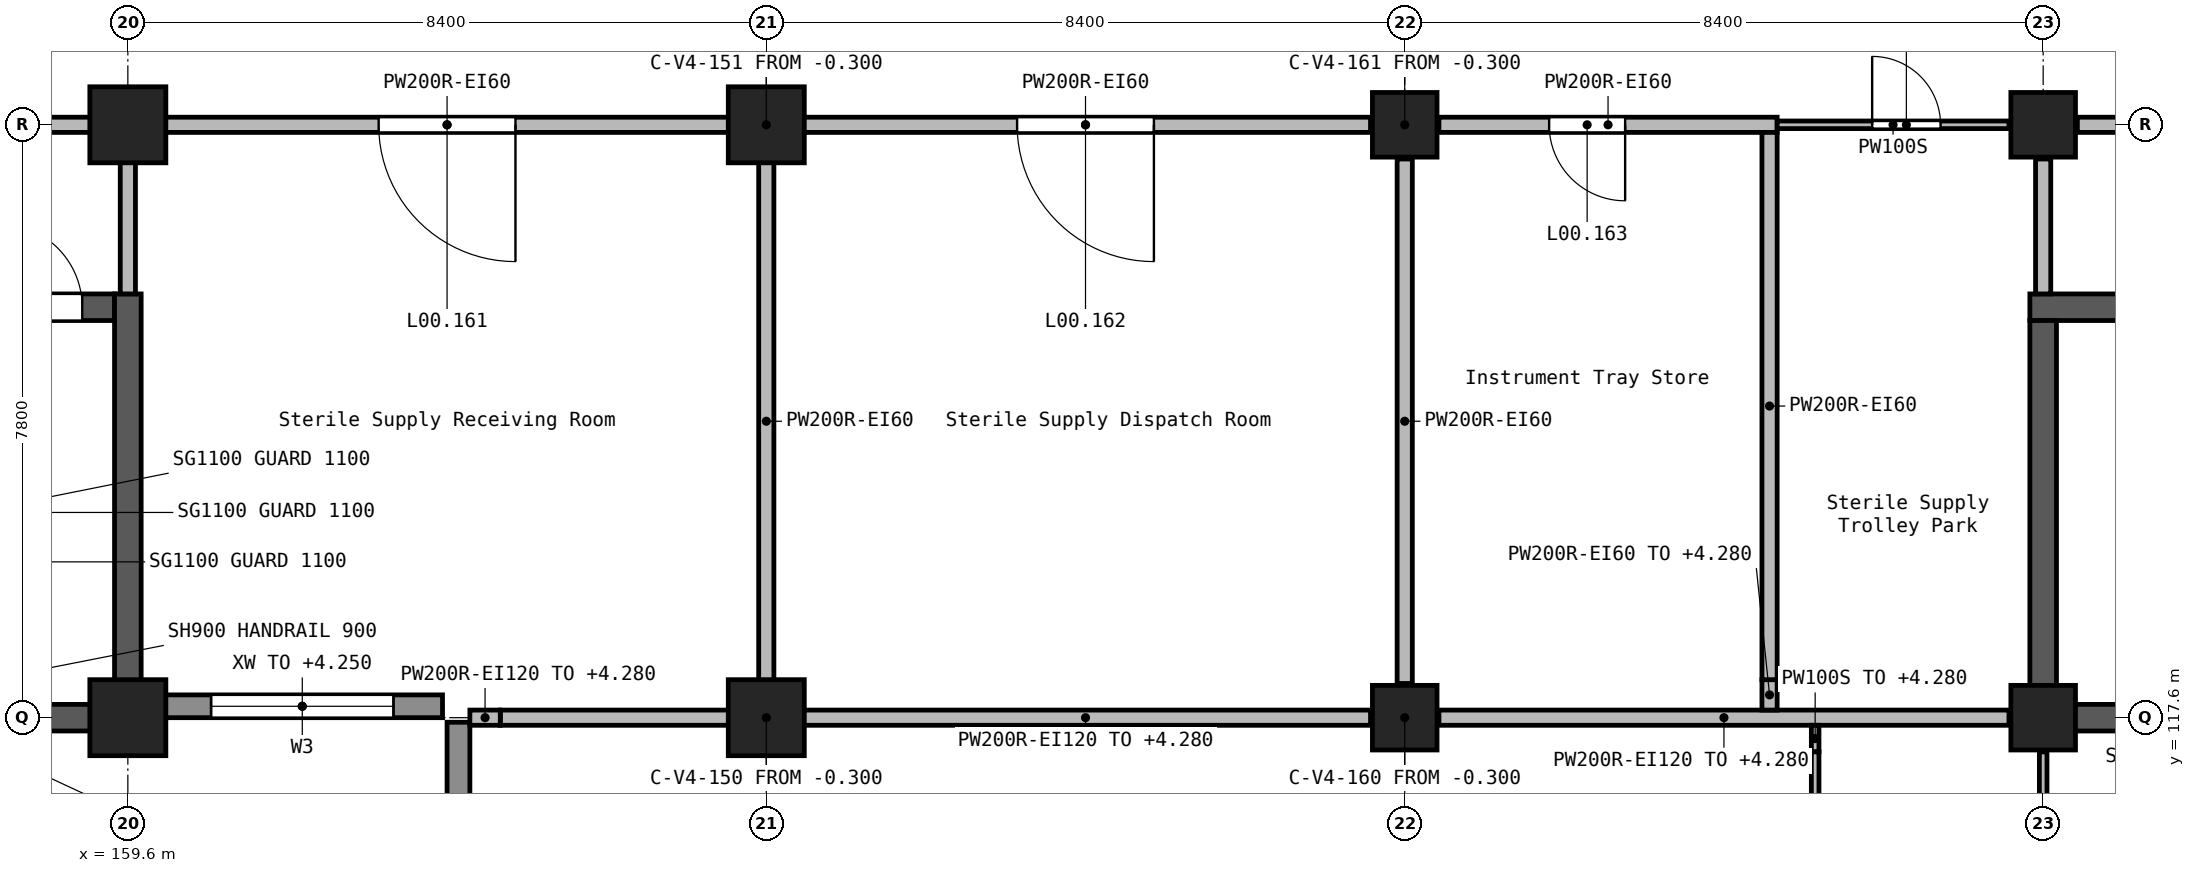
"""IFC4 building model, lengths in metres.
Left out: names, types, materials, properties, quantities, classifications, styles, units other than length and angle.
Written with IfcOpenShell. Run it as: python <this file> out.ifc"""

import sys

from ifc_helpers import new_model, si_unit, direction, frame, frame_2d, origin, origin_2d, place, context, subcontext, project, spatial, rectangle, extrude, element, fill, save


model = new_model("IFC4")
c1 = context("Model", 3, precision=1e-05, world=origin(), true_north=direction((0.0, 1.0)))
c2 = subcontext(c1, "Body", "Model", "MODEL_VIEW")
j1 = project(units=[si_unit("LENGTHUNIT", "METRE"), si_unit("PLANEANGLEUNIT", "RADIAN")], contexts=[c1])
p1 = place(None, origin())
s1 = spatial("IfcSite", under=j1, at=p1, CompositionType="ELEMENT")
p2 = place(p1, origin())
s2 = spatial("IfcBuilding", under=s1, at=p2, CompositionType="ELEMENT")
p3 = place(p2, origin())
s3 = spatial("IfcBuildingStorey", under=s2, at=p3, CompositionType="ELEMENT", Elevation=0.0)
for number, where, z_axis, x_axis in (
    (1, (159.6, 117.6, -0.3), (0.0, 0.0, 1.0), (1.0, 0.0, 0.0)),
    (2, (159.6, 125.4, -0.3), (0.0, 0.0, 1.0), (1.0, 0.0, 0.0)),
    (3, (168.0, 117.6, -0.3), (0.0, 0.0, 1.0), (1.0, 0.0, 0.0)),
    (4, (168.0, 125.4, -0.3), (0.0, 0.0, 1.0), (1.0, 0.0, 0.0)),
):
    element("IfcColumn", number, at=place(p3, frame(where, z_axis=z_axis, x_axis=x_axis)), inside=s3, PredefinedType="COLUMN", context=c2, shape_type="SweptSolid", body=[
        extrude(rectangle(XDim=1.0, YDim=1.0, at=origin_2d()), origin(), (0.0, 0.0, 1.0), 5.7),
    ])
for number, where, z_axis, x_axis in (
    (5, (176.4, 117.6, -0.3), (0.0, 0.0, 1.0), (1.0, 0.0, 0.0)),
    (6, (176.4, 125.4, -0.3), (0.0, 0.0, 1.0), (1.0, 0.0, 0.0)),
    (7, (184.8, 117.6, -0.3), (0.0, 0.0, 1.0), (1.0, 0.0, 0.0)),
    (8, (184.8, 125.4, -0.3), (0.0, 0.0, 1.0), (1.0, 0.0, 0.0)),
):
    element("IfcColumn", number, at=place(p3, frame(where, z_axis=z_axis, x_axis=x_axis)), inside=s3, PredefinedType="COLUMN", context=c2, shape_type="SweptSolid", body=[
        extrude(rectangle(XDim=0.85, YDim=0.85, at=origin_2d()), origin(), (0.0, 0.0, 1.0), 5.7),
    ])
p4 = place(p3, frame((151.025, 123.0, -0.3), z_axis=(0.0, 0.0, 1.0), x_axis=(1.0, 0.0, 0.0)))
e9 = element("IfcWall", 9, at=p4, inside=s3, PredefinedType="SHEAR", context=c2, shape_type="SweptSolid", body=[
    extrude(rectangle(XDim=8.4, YDim=0.35, at=frame_2d((4.2, 0.0))), origin(), (0.0, 0.0, 1.0), 5.7),
])
p5 = place(p4, frame((6.875, 0.0, 0.3)))
e10 = element("IfcOpeningElement", 10, at=p5, cuts=e9, PredefinedType="OPENING", context=c2, shape_type="SweptSolid", body=[
    extrude(rectangle(XDim=1.1, YDim=2.1, at=frame_2d((0.55, 1.05))), frame((0.0, 0.185, 0.0), z_axis=(0.0, -1.0, 0.0), x_axis=(1.0, 0.0, 0.0)), (0.0, 0.0, 1.0), 0.37),
])
p6 = place(p3, frame((151.375, 117.6, -0.3), z_axis=(0.0, 0.0, 1.0), x_axis=(1.0, 0.0, 0.0)))
e11 = element("IfcWall", 11, at=p6, inside=s3, PredefinedType="SHEAR", context=c2, shape_type="SweptSolid", body=[
    extrude(rectangle(XDim=8.05, YDim=0.35, at=frame_2d((4.025, 0.0))), origin(), (0.0, 0.0, 1.0), 5.7),
])
p7 = place(p6, frame((3.325, 0.0, 0.3)))
e12 = element("IfcOpeningElement", 12, at=p7, cuts=e11, PredefinedType="OPENING", context=c2, shape_type="SweptSolid", body=[
    extrude(rectangle(XDim=1.4, YDim=2.1, at=frame_2d((0.7, 1.05))), frame((0.0, 0.185, 0.0), z_axis=(0.0, -1.0, 0.0), x_axis=(1.0, 0.0, 0.0)), (0.0, 0.0, 1.0), 0.37),
])
p8 = place(p3, frame((159.6, 117.425, -0.3), z_axis=(0.0, 0.0, 1.0), x_axis=(0.0, 1.0, 0.0)))
e13 = element("IfcWall", 13, at=p8, inside=s3, PredefinedType="SHEAR", context=c2, shape_type="SweptSolid", body=[
    extrude(rectangle(XDim=5.75, YDim=0.35, at=frame_2d((2.875, 0.0))), origin(), (0.0, 0.0, 1.0), 5.7),
])
p9 = place(p3, frame((184.625, 123.0, -0.3), z_axis=(0.0, 0.0, 1.0), x_axis=(1.0, 0.0, 0.0)))
e14 = element("IfcWall", 14, at=p9, inside=s3, PredefinedType="SHEAR", context=c2, shape_type="SweptSolid", body=[
    extrude(rectangle(XDim=8.4, YDim=0.35, at=frame_2d((4.2, 0.0))), origin(), (0.0, 0.0, 1.0), 5.7),
])
p10 = place(p9, frame((6.875, 0.0, 0.3)))
e15 = element("IfcOpeningElement", 15, at=p10, cuts=e14, PredefinedType="OPENING", context=c2, shape_type="SweptSolid", body=[
    extrude(rectangle(XDim=1.1, YDim=2.1, at=frame_2d((0.55, 1.05))), frame((0.0, 0.185, 0.0), z_axis=(0.0, -1.0, 0.0), x_axis=(1.0, 0.0, 0.0)), (0.0, 0.0, 1.0), 0.37),
])
p11 = place(p3, frame((184.8, 117.425, -0.3), z_axis=(0.0, 0.0, 1.0), x_axis=(0.0, 1.0, 0.0)))
e16 = element("IfcWall", 16, at=p11, inside=s3, PredefinedType="SHEAR", context=c2, shape_type="SweptSolid", body=[
    extrude(rectangle(XDim=5.4, YDim=0.35, at=frame_2d((2.7, 0.0))), origin(), (0.0, 0.0, 1.0), 5.7),
])
p12 = place(p3, frame((184.975, 117.6, -0.3), z_axis=(0.0, 0.0, 1.0), x_axis=(1.0, 0.0, 0.0)))
e17 = element("IfcWall", 17, at=p12, inside=s3, PredefinedType="SHEAR", context=c2, shape_type="SweptSolid", body=[
    extrude(rectangle(XDim=8.05, YDim=0.35, at=frame_2d((4.025, 0.0))), origin(), (0.0, 0.0, 1.0), 5.7),
])
p13 = place(p3, frame((163.95, 117.54, 0.0), z_axis=(0.0, 0.0, 1.0), x_axis=(0.0, -1.0, 0.0)))
e18 = element("IfcWall", 18, at=p13, inside=s3, PredefinedType="STANDARD", context=c2, shape_type="SweptSolid", body=[
    extrude(rectangle(XDim=7.94, YDim=0.3, at=frame_2d((3.97, 0.0))), origin(), (0.0, 0.0, 1.0), 4.25),
])
p14 = place(p13, frame((1.385, 0.0, 1.2)))
e19 = element("IfcOpeningElement", 19, at=p14, cuts=e18, PredefinedType="OPENING", context=c2, shape_type="SweptSolid", body=[
    extrude(rectangle(XDim=1.2, YDim=1.2, at=frame_2d((0.6, 0.6))), frame((0.0, 0.16, 0.0), z_axis=(0.0, -1.0, 0.0), x_axis=(1.0, 0.0, 0.0)), (0.0, 0.0, 1.0), 0.32),
])
p15 = place(p13, frame((5.355, 0.0, 1.2)))
e20 = element("IfcOpeningElement", 20, at=p15, cuts=e18, PredefinedType="OPENING", context=c2, shape_type="SweptSolid", body=[
    extrude(rectangle(XDim=1.2, YDim=1.2, at=frame_2d((0.6, 0.6))), frame((0.0, 0.16, 0.0), z_axis=(0.0, -1.0, 0.0), x_axis=(1.0, 0.0, 0.0)), (0.0, 0.0, 1.0), 0.32),
])
p16 = place(p3, frame((160.05, 117.75, 0.0), z_axis=(0.0, 0.0, 1.0), x_axis=(1.0, 0.0, 0.0)))
e21 = element("IfcWall", 21, at=p16, inside=s3, PredefinedType="STANDARD", context=c2, shape_type="SweptSolid", body=[
    extrude(rectangle(XDim=3.69, YDim=0.3, at=frame_2d((1.845, 0.0))), origin(), (0.0, 0.0, 1.0), 4.25),
])
p17 = place(p16, frame((0.645, 0.0, 0.9)))
e22 = element("IfcOpeningElement", 22, at=p17, cuts=e21, PredefinedType="OPENING", context=c2, shape_type="SweptSolid", body=[
    extrude(rectangle(XDim=2.4, YDim=1.5, at=frame_2d((1.2, 0.75))), frame((0.0, 0.16, 0.0), z_axis=(0.0, -1.0, 0.0), x_axis=(1.0, 0.0, 0.0)), (0.0, 0.0, 1.0), 0.32),
])
p18 = place(p3, frame((181.3, 125.4, 0.0), z_axis=(0.0, 0.0, 1.0), x_axis=(-1.0, 0.0, 0.0)))
e23 = element("IfcWall", 23, at=p18, inside=s3, PredefinedType="SOLIDWALL", context=c2, shape_type="SweptSolid", body=[
    extrude(rectangle(XDim=4.45, YDim=0.2, at=frame_2d((2.225, 0.0))), origin(), (0.0, 0.0, 1.0), 5.05),
])
p19 = place(p18, frame((2.0, 0.0, 0.0)))
e24 = element("IfcOpeningElement", 24, at=p19, cuts=e23, PredefinedType="OPENING", context=c2, shape_type="SweptSolid", body=[
    extrude(rectangle(XDim=1.0, YDim=2.1, at=frame_2d((0.5, 1.05))), frame((0.0, 0.11, 0.0), z_axis=(0.0, -1.0, 0.0), x_axis=(1.0, 0.0, 0.0)), (0.0, 0.0, 1.0), 0.22),
])
p20 = place(p3, frame((175.95, 125.4, 0.0), z_axis=(0.0, 0.0, 1.0), x_axis=(-1.0, 0.0, 0.0)))
e25 = element("IfcWall", 25, at=p20, inside=s3, PredefinedType="SOLIDWALL", context=c2, shape_type="SweptSolid", body=[
    extrude(rectangle(XDim=7.5, YDim=0.2, at=frame_2d((3.75, 0.0))), origin(), (0.0, 0.0, 1.0), 5.05),
])
p21 = place(p20, frame((2.85, 0.0, 0.0)))
e26 = element("IfcOpeningElement", 26, at=p21, cuts=e25, PredefinedType="OPENING", context=c2, shape_type="SweptSolid", body=[
    extrude(rectangle(XDim=1.8, YDim=2.1, at=frame_2d((0.9, 1.05))), frame((0.0, 0.11, 0.0), z_axis=(0.0, -1.0, 0.0), x_axis=(1.0, 0.0, 0.0)), (0.0, 0.0, 1.0), 0.22),
])
p22 = place(p3, frame((167.55, 125.4, 0.0), z_axis=(0.0, 0.0, 1.0), x_axis=(-1.0, 0.0, 0.0)))
e27 = element("IfcWall", 27, at=p22, inside=s3, PredefinedType="SOLIDWALL", context=c2, shape_type="SweptSolid", body=[
    extrude(rectangle(XDim=7.5, YDim=0.2, at=frame_2d((3.75, 0.0))), origin(), (0.0, 0.0, 1.0), 5.05),
])
p23 = place(p22, frame((2.85, 0.0, 0.0)))
e28 = element("IfcOpeningElement", 28, at=p23, cuts=e27, PredefinedType="OPENING", context=c2, shape_type="SweptSolid", body=[
    extrude(rectangle(XDim=1.8, YDim=2.1, at=frame_2d((0.9, 1.05))), frame((0.0, 0.11, 0.0), z_axis=(0.0, -1.0, 0.0), x_axis=(1.0, 0.0, 0.0)), (0.0, 0.0, 1.0), 0.22),
])
for number, where, z_axis, x_axis in (
    (29, (184.35, 117.6, 0.0), (0.0, 0.0, 1.0), (-1.0, 0.0, 0.0)),
    (30, (175.95, 117.6, 0.0), (0.0, 0.0, 1.0), (-1.0, 0.0, 0.0)),
):
    element("IfcWall", number, at=place(p3, frame(where, z_axis=z_axis, x_axis=x_axis)), inside=s3, PredefinedType="SOLIDWALL", context=c2, shape_type="SweptSolid", body=[
        extrude(rectangle(XDim=7.5, YDim=0.2, at=frame_2d((3.75, 0.0))), origin(), (0.0, 0.0, 1.0), 4.28),
    ])
p24 = place(p3, frame((167.55, 117.6, 0.0), z_axis=(0.0, 0.0, 1.0), x_axis=(-1.0, 0.0, 0.0)))
e31 = element("IfcWall", 31, at=p24, inside=s3, PredefinedType="SOLIDWALL", context=c2, shape_type="SweptSolid", body=[
    extrude(rectangle(XDim=3.05, YDim=0.2, at=frame_2d((1.525, 0.0))), origin(), (0.0, 0.0, 1.0), 4.28),
])
p25 = place(p3, frame((164.5, 117.6, 0.0), z_axis=(0.0, 0.0, 1.0), x_axis=(-1.0, 0.0, 0.0)))
e32 = element("IfcWall", 32, at=p25, inside=s3, PredefinedType="SOLIDWALL", context=c2, shape_type="SweptSolid", body=[
    extrude(rectangle(XDim=0.4, YDim=0.2, at=frame_2d((0.2, 0.0))), origin(), (0.0, 0.0, 1.0), 4.28),
])
p26 = place(p3, frame((151.65, 125.4, 0.0), z_axis=(0.0, 0.0, 1.0), x_axis=(1.0, 0.0, 0.0)))
e33 = element("IfcWall", 33, at=p26, inside=s3, PredefinedType="SOLIDWALL", context=c2, shape_type="SweptSolid", body=[
    extrude(rectangle(XDim=7.5, YDim=0.2, at=frame_2d((3.75, 0.0))), origin(), (0.0, 0.0, 1.0), 5.05),
])
p27 = place(p26, frame((3.2, 0.0, 0.0)))
e34 = element("IfcOpeningElement", 34, at=p27, cuts=e33, PredefinedType="OPENING", context=c2, shape_type="SweptSolid", body=[
    extrude(rectangle(XDim=1.1, YDim=2.1, at=frame_2d((0.55, 1.05))), frame((0.0, 0.11, 0.0), z_axis=(0.0, -1.0, 0.0), x_axis=(1.0, 0.0, 0.0)), (0.0, 0.0, 1.0), 0.22),
])
p28 = place(p3, frame((185.25, 125.4, 0.0), z_axis=(0.0, 0.0, 1.0), x_axis=(1.0, 0.0, 0.0)))
e35 = element("IfcWall", 35, at=p28, inside=s3, PredefinedType="SOLIDWALL", context=c2, shape_type="SweptSolid", body=[
    extrude(rectangle(XDim=7.5, YDim=0.2, at=frame_2d((3.75, 0.0))), origin(), (0.0, 0.0, 1.0), 5.05),
])
p29 = place(p28, frame((3.2, 0.0, 0.0)))
e36 = element("IfcOpeningElement", 36, at=p29, cuts=e35, PredefinedType="OPENING", context=c2, shape_type="SweptSolid", body=[
    extrude(rectangle(XDim=1.1, YDim=2.1, at=frame_2d((0.55, 1.05))), frame((0.0, 0.11, 0.0), z_axis=(0.0, -1.0, 0.0), x_axis=(1.0, 0.0, 0.0)), (0.0, 0.0, 1.0), 0.22),
])
for number, where, z_axis, x_axis in (
    (37, (168.0, 118.05, 0.0), (0.0, 0.0, 1.0), (0.0, 1.0, 0.0)),
    (38, (176.4, 118.05, 0.0), (0.0, 0.0, 1.0), (0.0, 1.0, 0.0)),
):
    element("IfcWall", number, at=place(p3, frame(where, z_axis=z_axis, x_axis=x_axis)), inside=s3, PredefinedType="SOLIDWALL", context=c2, shape_type="SweptSolid", body=[
        extrude(rectangle(XDim=6.9, YDim=0.2, at=frame_2d((3.45, 0.0))), origin(), (0.0, 0.0, 1.0), 5.05),
    ])
p30 = place(p3, frame((181.2, 117.7, 0.0), z_axis=(0.0, 0.0, 1.0), x_axis=(0.0, 1.0, 0.0)))
e39 = element("IfcWall", 39, at=p30, inside=s3, PredefinedType="SOLIDWALL", context=c2, shape_type="SweptSolid", body=[
    extrude(rectangle(XDim=0.4, YDim=0.2, at=frame_2d((0.2, 0.0))), origin(), (0.0, 0.0, 1.0), 4.28),
])
p31 = place(p3, frame((181.2, 118.1, 0.0), z_axis=(0.0, 0.0, 1.0), x_axis=(0.0, 1.0, 0.0)))
e40 = element("IfcWall", 40, at=p31, inside=s3, PredefinedType="SOLIDWALL", context=c2, shape_type="SweptSolid", body=[
    extrude(rectangle(XDim=7.2, YDim=0.2, at=frame_2d((3.6, 0.0))), origin(), (0.0, 0.0, 1.0), 5.05),
])
for number, where, z_axis, x_axis in (
    (41, (159.6, 123.175, 0.0), (0.0, 0.0, 1.0), (0.0, 1.0, 0.0)),
    (42, (184.8, 123.175, 0.0), (0.0, 0.0, 1.0), (0.0, 1.0, 0.0)),
):
    element("IfcWall", number, at=place(p3, frame(where, z_axis=z_axis, x_axis=x_axis)), inside=s3, PredefinedType="SOLIDWALL", context=c2, shape_type="SweptSolid", body=[
        extrude(rectangle(XDim=1.775, YDim=0.2, at=frame_2d((0.887, 0.0))), origin(), (0.0, 0.0, 1.0), 5.05),
    ])
p32 = place(p3, frame((181.8, 117.5, 0.0), z_axis=(0.0, 0.0, 1.0), x_axis=(0.0, -1.0, 0.0)))
e43 = element("IfcWall", 43, at=p32, inside=s3, PredefinedType="PARTITIONING", context=c2, shape_type="SweptSolid", body=[
    extrude(rectangle(XDim=0.35, YDim=0.1, at=frame_2d((0.175, 0.0))), origin(), (0.0, 0.0, 1.0), 4.28),
])
p33 = place(p3, frame((181.8, 117.15, 0.0), z_axis=(0.0, 0.0, 1.0), x_axis=(0.0, -1.0, 0.0)))
e44 = element("IfcWall", 44, at=p33, inside=s3, PredefinedType="PARTITIONING", context=c2, shape_type="SweptSolid", body=[
    extrude(rectangle(XDim=18.2, YDim=0.1, at=frame_2d((9.1, 0.0))), origin(), (0.0, 0.0, 1.0), 5.05),
])
p34 = place(p33, frame((8.451, 0.0, 0.0)))
e45 = element("IfcOpeningElement", 45, at=p34, cuts=e44, PredefinedType="OPENING", context=c2, shape_type="SweptSolid", body=[
    extrude(rectangle(XDim=1.8, YDim=2.1, at=frame_2d((0.9, 1.05))), frame((0.0, 0.06, 0.0), z_axis=(0.0, -1.0, 0.0), x_axis=(1.0, 0.0, 0.0)), (0.0, 0.0, 1.0), 0.12),
])
p35 = place(p33, frame((5.102, 0.0, 0.0)))
e46 = element("IfcOpeningElement", 46, at=p35, cuts=e44, PredefinedType="OPENING", context=c2, shape_type="SweptSolid", body=[
    extrude(rectangle(XDim=0.9, YDim=2.1, at=frame_2d((0.45, 1.05))), frame((0.0, 0.06, 0.0), z_axis=(0.0, -1.0, 0.0), x_axis=(1.0, 0.0, 0.0)), (0.0, 0.0, 1.0), 0.12),
])
p36 = place(p33, frame((0.901, 0.0, 0.0)))
e47 = element("IfcOpeningElement", 47, at=p36, cuts=e44, PredefinedType="OPENING", context=c2, shape_type="SweptSolid", body=[
    extrude(rectangle(XDim=0.9, YDim=2.1, at=frame_2d((0.45, 1.05))), frame((0.0, 0.06, 0.0), z_axis=(0.0, -1.0, 0.0), x_axis=(1.0, 0.0, 0.0)), (0.0, 0.0, 1.0), 0.12),
])
p37 = place(p3, frame((184.8, 117.15, 0.0), z_axis=(0.0, 0.0, 1.0), x_axis=(0.0, -1.0, 0.0)))
e48 = element("IfcWall", 48, at=p37, inside=s3, PredefinedType="PARTITIONING", context=c2, shape_type="SweptSolid", body=[
    extrude(rectangle(XDim=18.2, YDim=0.1, at=frame_2d((9.1, 0.0))), origin(), (0.0, 0.0, 1.0), 5.05),
])
p38 = place(p37, frame((11.7, 0.0, 0.0)))
e49 = element("IfcOpeningElement", 49, at=p38, cuts=e48, PredefinedType="OPENING", context=c2, shape_type="SweptSolid", body=[
    extrude(rectangle(XDim=0.9, YDim=2.1, at=frame_2d((0.45, 1.05))), frame((0.0, 0.06, 0.0), z_axis=(0.0, -1.0, 0.0), x_axis=(1.0, 0.0, 0.0)), (0.0, 0.0, 1.0), 0.12),
])
p39 = place(p37, frame((5.7, 0.0, 0.0)))
e50 = element("IfcOpeningElement", 50, at=p39, cuts=e48, PredefinedType="OPENING", context=c2, shape_type="SweptSolid", body=[
    extrude(rectangle(XDim=0.9, YDim=2.1, at=frame_2d((0.45, 1.05))), frame((0.0, 0.06, 0.0), z_axis=(0.0, -1.0, 0.0), x_axis=(1.0, 0.0, 0.0)), (0.0, 0.0, 1.0), 0.12),
])
p40 = place(p37, frame((1.5, 0.0, 0.0)))
e51 = element("IfcOpeningElement", 51, at=p40, cuts=e48, PredefinedType="OPENING", context=c2, shape_type="SweptSolid", body=[
    extrude(rectangle(XDim=0.9, YDim=2.1, at=frame_2d((0.45, 1.05))), frame((0.0, 0.06, 0.0), z_axis=(0.0, -1.0, 0.0), x_axis=(1.0, 0.0, 0.0)), (0.0, 0.0, 1.0), 0.12),
])
p41 = place(p3, frame((181.3, 125.4, 0.0), z_axis=(0.0, 0.0, 1.0), x_axis=(1.0, 0.0, 0.0)))
e52 = element("IfcWall", 52, at=p41, inside=s3, PredefinedType="PARTITIONING", context=c2, shape_type="SweptSolid", body=[
    extrude(rectangle(XDim=3.05, YDim=0.1, at=frame_2d((1.525, 0.0))), origin(), (0.0, 0.0, 1.0), 5.05),
])
p42 = place(p41, frame((1.25, 0.0, 0.0)))
e53 = element("IfcOpeningElement", 53, at=p42, cuts=e52, PredefinedType="OPENING", context=c2, shape_type="SweptSolid", body=[
    extrude(rectangle(XDim=0.9, YDim=2.1, at=frame_2d((0.45, 1.05))), frame((0.0, 0.06, 0.0), z_axis=(0.0, -1.0, 0.0), x_axis=(1.0, 0.0, 0.0)), (0.0, 0.0, 1.0), 0.12),
])
p43 = place(p17, origin())
e54 = element("IfcWindow", 54, at=p43, inside=s3, PartitioningType="SINGLE_PANEL", PredefinedType="WINDOW", context=c2, shape_type="SweptSolid", body=[
    extrude(rectangle(XDim=2.4, YDim=1.5, at=frame_2d((1.2, 0.75))), frame((0.0, 0.03, 0.0), z_axis=(0.0, -1.0, 0.0), x_axis=(1.0, 0.0, 0.0)), (0.0, 0.0, 1.0), 0.06),
])
fill(e22, e54)
p44 = place(p5, frame((1.1, 0.0, 0.0), z_axis=(0.0, 0.0, 1.0), x_axis=(-1.0, 0.0, 0.0)))
e55 = element("IfcDoor", 55, at=p44, inside=s3, OperationType="SINGLE_SWING_LEFT", PredefinedType="DOOR", context=c2, shape_type="SweptSolid", body=[
    extrude(rectangle(XDim=1.1, YDim=2.1, at=frame_2d((0.55, 1.05))), frame((0.0, 0.025, 0.0), z_axis=(0.0, -1.0, 0.0), x_axis=(1.0, 0.0, 0.0)), (0.0, 0.0, 1.0), 0.05),
])
fill(e10, e55)
p45 = place(p23, origin())
e56 = element("IfcDoor", 56, at=p45, inside=s3, OperationType="DOUBLE_DOOR_SINGLE_SWING", PredefinedType="DOOR", context=c2, shape_type="SweptSolid", body=[
    extrude(rectangle(XDim=1.8, YDim=2.1, at=frame_2d((0.9, 1.05))), frame((0.0, 0.025, 0.0), z_axis=(0.0, -1.0, 0.0), x_axis=(1.0, 0.0, 0.0)), (0.0, 0.0, 1.0), 0.05),
])
fill(e28, e56)
p46 = place(p21, origin())
e57 = element("IfcDoor", 57, at=p46, inside=s3, OperationType="DOUBLE_DOOR_SINGLE_SWING", PredefinedType="DOOR", context=c2, shape_type="SweptSolid", body=[
    extrude(rectangle(XDim=1.8, YDim=2.1, at=frame_2d((0.9, 1.05))), frame((0.0, 0.025, 0.0), z_axis=(0.0, -1.0, 0.0), x_axis=(1.0, 0.0, 0.0)), (0.0, 0.0, 1.0), 0.05),
])
fill(e26, e57)
p47 = place(p19, origin())
e58 = element("IfcDoor", 58, at=p47, inside=s3, OperationType="SINGLE_SWING_RIGHT", PredefinedType="DOOR", context=c2, shape_type="SweptSolid", body=[
    extrude(rectangle(XDim=1.0, YDim=2.1, at=frame_2d((0.5, 1.05))), frame((0.0, 0.025, 0.0), z_axis=(0.0, -1.0, 0.0), x_axis=(1.0, 0.0, 0.0)), (0.0, 0.0, 1.0), 0.05),
])
fill(e24, e58)
p48 = place(p42, frame((0.9, 0.0, 0.0), z_axis=(0.0, 0.0, 1.0), x_axis=(-1.0, 0.0, 0.0)))
e59 = element("IfcDoor", 59, at=p48, inside=s3, OperationType="SINGLE_SWING_LEFT", PredefinedType="DOOR", context=c2, shape_type="SweptSolid", body=[
    extrude(rectangle(XDim=0.9, YDim=2.1, at=frame_2d((0.45, 1.05))), frame((0.0, 0.025, 0.0), z_axis=(0.0, -1.0, 0.0), x_axis=(1.0, 0.0, 0.0)), (0.0, 0.0, 1.0), 0.05),
])
fill(e53, e59)
save(model, sys.argv[1])
